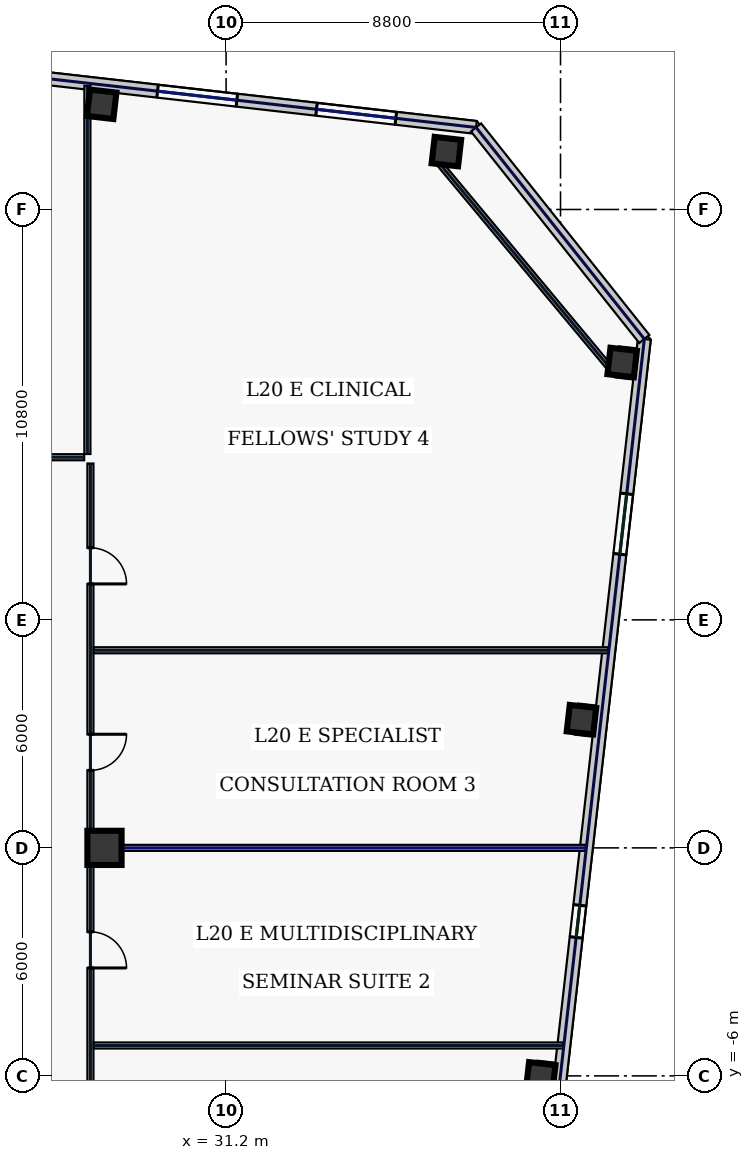
"""IFC4 building model, lengths in metres.
Left out: names, types, materials, properties, quantities, classifications, styles, units other than length and angle.
Written with IfcOpenShell. Run it as: python <this file> out.ifc"""

import sys

from ifc_helpers import new_model, si_unit, direction, frame, frame_2d, origin, origin_2d, place, context, subcontext, project, spatial, rectangle, hollow_rectangle, extrude, element, fill, save


model = new_model("IFC4")
c1 = context("Model", 3, precision=1e-05, world=origin(), true_north=direction((0.0, 1.0)))
c2 = subcontext(c1, "Body", "Model", "MODEL_VIEW")
j1 = project(units=[si_unit("LENGTHUNIT", "METRE"), si_unit("PLANEANGLEUNIT", "RADIAN")], contexts=[c1])
p1 = place(None, origin())
s1 = spatial("IfcSite", under=j1, at=p1, CompositionType="ELEMENT")
p2 = place(p1, origin())
s2 = spatial("IfcBuilding", under=s1, at=p2, CompositionType="ELEMENT")
p3 = place(p2, frame((0.0, 0.0, 93.4)))
s3 = spatial("IfcBuildingStorey", under=s2, at=p3, CompositionType="ELEMENT", Elevation=93.4)
p4 = place(p3, frame((28.0, 0.0, 0.0), z_axis=(0.0, 0.0, 1.0), x_axis=(1.0, 0.0, 0.0)))
e1 = element("IfcColumn", 1, at=p4, inside=s3, PredefinedType="COLUMN", context=c2, shape_type="SweptSolid", body=[
    extrude(hollow_rectangle(XDim=0.9, YDim=0.9, WallThickness=0.04, at=origin_2d()), origin(), (0.0, 0.0, 1.0), 3.74),
])
for number, where, z_axis, x_axis in (
    (2, (36.997, 18.323, 0.0), (0.0, 0.0, 1.0), (0.994, -0.113, 0.0)),
    (3, (27.926, 19.568, 0.0), (0.0, 0.0, 1.0), (0.994, -0.113, 0.0)),
    (4, (39.48, -6.025, 0.0), (0.0, 0.0, 1.0), (0.994, -0.113, 0.0)),
    (5, (40.551, 3.375, 0.0), (0.0, 0.0, 1.0), (0.994, -0.113, 0.0)),
    (6, (41.622, 12.774, 0.0), (0.0, 0.0, 1.0), (0.994, -0.113, 0.0)),
):
    element("IfcColumn", number, at=place(p3, frame(where, z_axis=z_axis, x_axis=x_axis)), inside=s3, PredefinedType="COLUMN", context=c2, shape_type="SweptSolid", body=[
        extrude(hollow_rectangle(XDim=0.7, YDim=0.7, WallThickness=0.032, at=origin_2d()), origin(), (0.0, 0.0, 1.0), 3.74),
    ])
p5 = place(p3, frame((37.777, 18.958, 0.0), z_axis=(0.0, 0.0, 1.0), x_axis=(-0.993571362037, 0.113207546299, 0.0)))
e7 = element("IfcWall", 7, at=p5, inside=s3, PredefinedType="STANDARD", context=c2, shape_type="SweptSolid", body=[
    extrude(rectangle(XDim=21.223, YDim=0.34, at=frame_2d((10.611, 0.0))), origin(), (0.0, 0.0, 1.0), 3.74),
])
p6 = place(p5, frame((15.756, 0.0, 0.22)))
e8 = element("IfcOpeningElement", 8, at=p6, cuts=e7, PredefinedType="OPENING", context=c2, shape_type="SweptSolid", body=[
    extrude(rectangle(XDim=1.6, YDim=1.2, at=frame_2d((0.8, 0.6))), frame((0.0, 0.18, 0.0), z_axis=(0.0, -1.0, 0.0), x_axis=(1.0, 0.0, 0.0)), (0.0, 0.0, 1.0), 0.36),
])
p7 = place(p5, frame((11.285, 0.0, 0.67)))
e9 = element("IfcOpeningElement", 9, at=p7, cuts=e7, PredefinedType="OPENING", context=c2, shape_type="SweptSolid", body=[
    extrude(rectangle(XDim=2.1, YDim=2.2, at=frame_2d((1.05, 1.1))), frame((0.0, 0.18, 0.0), z_axis=(0.0, -1.0, 0.0), x_axis=(1.0, 0.0, 0.0)), (0.0, 0.0, 1.0), 0.36),
])
p8 = place(p5, frame((6.336, 0.0, 0.67)))
e10 = element("IfcOpeningElement", 10, at=p8, cuts=e7, PredefinedType="OPENING", context=c2, shape_type="SweptSolid", body=[
    extrude(rectangle(XDim=2.1, YDim=2.2, at=frame_2d((1.05, 1.1))), frame((0.0, 0.18, 0.0), z_axis=(0.0, -1.0, 0.0), x_axis=(1.0, 0.0, 0.0)), (0.0, 0.0, 1.0), 0.36),
])
p9 = place(p5, frame((2.125, 0.0, 0.67)))
e11 = element("IfcOpeningElement", 11, at=p9, cuts=e7, PredefinedType="OPENING", context=c2, shape_type="SweptSolid", body=[
    extrude(rectangle(XDim=2.1, YDim=2.2, at=frame_2d((1.05, 1.1))), frame((0.0, 0.18, 0.0), z_axis=(0.0, -1.0, 0.0), x_axis=(1.0, 0.0, 0.0)), (0.0, 0.0, 1.0), 0.36),
])
p10 = place(p3, frame((37.768, -25.556, 0.0), z_axis=(0.0, 0.0, 1.0), x_axis=(0.113201605824, 0.993572038877, 0.0)))
e12 = element("IfcWall", 12, at=p10, inside=s3, PredefinedType="STANDARD", context=c2, shape_type="SweptSolid", body=[
    extrude(rectangle(XDim=39.2, YDim=0.34, at=frame_2d((19.6, 0.0))), origin(), (0.0, 0.0, 1.0), 3.74),
])
p11 = place(p10, frame((4.1, 0.0, 0.58)))
e13 = element("IfcOpeningElement", 13, at=p11, cuts=e12, PredefinedType="OPENING", context=c2, shape_type="SweptSolid", body=[
    extrude(rectangle(XDim=1.6, YDim=2.3, at=frame_2d((0.8, 1.15))), frame((0.0, 0.18, 0.0), z_axis=(0.0, -1.0, 0.0), x_axis=(1.0, 0.0, 0.0)), (0.0, 0.0, 1.0), 0.36),
])
p12 = place(p10, frame((13.9, 0.0, 0.58)))
e14 = element("IfcOpeningElement", 14, at=p12, cuts=e12, PredefinedType="OPENING", context=c2, shape_type="SweptSolid", body=[
    extrude(rectangle(XDim=1.6, YDim=2.3, at=frame_2d((0.8, 1.15))), frame((0.0, 0.18, 0.0), z_axis=(0.0, -1.0, 0.0), x_axis=(1.0, 0.0, 0.0)), (0.0, 0.0, 1.0), 0.36),
])
p13 = place(p10, frame((23.35, 0.0, 0.75)))
e15 = element("IfcOpeningElement", 15, at=p13, cuts=e12, PredefinedType="OPENING", context=c2, shape_type="SweptSolid", body=[
    extrude(rectangle(XDim=0.85, YDim=1.85, at=frame_2d((0.425, 0.925))), frame((0.0, 0.18, 0.0), z_axis=(0.0, -1.0, 0.0), x_axis=(1.0, 0.0, 0.0)), (0.0, 0.0, 1.0), 0.36),
])
p14 = place(p10, frame((33.5, 0.0, 0.58)))
e16 = element("IfcOpeningElement", 16, at=p14, cuts=e12, PredefinedType="OPENING", context=c2, shape_type="SweptSolid", body=[
    extrude(rectangle(XDim=1.6, YDim=2.3, at=frame_2d((0.8, 1.15))), frame((0.0, 0.18, 0.0), z_axis=(0.0, -1.0, 0.0), x_axis=(1.0, 0.0, 0.0)), (0.0, 0.0, 1.0), 0.36),
])
p15 = place(p3, frame((42.206, 13.392, 0.0), z_axis=(0.0, 0.0, 1.0), x_axis=(-0.622524521309, 0.782600294128, 0.0)))
e17 = element("IfcWall", 17, at=p15, inside=s3, PredefinedType="STANDARD", context=c2, shape_type="SweptSolid", body=[
    extrude(rectangle(XDim=7.113, YDim=0.34, at=frame_2d((3.557, 0.0))), origin(), (0.0, 0.0, 1.0), 3.74),
])
p16 = place(p3, frame((41.361, 12.556, 0.0), z_axis=(0.0, 0.0, 1.0), x_axis=(-0.640217638562, 0.768193579298, 0.0)))
e18 = element("IfcWall", 18, at=p16, inside=s3, PredefinedType="PARTITIONING", context=c2, shape_type="SweptSolid", body=[
    extrude(rectangle(XDim=7.224, YDim=0.16, at=frame_2d((3.612, 0.0))), origin(), (0.0, 0.0, 1.0), 3.74),
])
p17 = place(p3, frame((-27.465, 10.28, 0.0), z_axis=(0.0, 0.0, 1.0), x_axis=(1.0, 0.0, 0.0)))
e19 = element("IfcWall", 19, at=p17, inside=s3, PredefinedType="PARTITIONING", context=c2, shape_type="SweptSolid", body=[
    extrude(rectangle(XDim=54.93, YDim=0.16, at=frame_2d((27.465, 0.0))), origin(), (0.0, 0.0, 1.0), 3.74),
])
p18 = place(p17, frame((1.869, 0.0, 0.0)))
e20 = element("IfcOpeningElement", 20, at=p18, cuts=e19, PredefinedType="OPENING", context=c2, shape_type="SweptSolid", body=[
    extrude(rectangle(XDim=1.3, YDim=2.2, at=frame_2d((0.65, 1.1))), frame((0.0, 0.09, 0.0), z_axis=(0.0, -1.0, 0.0), x_axis=(1.0, 0.0, 0.0)), (0.0, 0.0, 1.0), 0.18),
])
p19 = place(p17, frame((8.08, 0.0, 0.0)))
e21 = element("IfcOpeningElement", 21, at=p19, cuts=e19, PredefinedType="OPENING", context=c2, shape_type="SweptSolid", body=[
    extrude(rectangle(XDim=0.95, YDim=2.2, at=frame_2d((0.475, 1.1))), frame((0.0, 0.09, 0.0), z_axis=(0.0, -1.0, 0.0), x_axis=(1.0, 0.0, 0.0)), (0.0, 0.0, 1.0), 0.18),
])
p20 = place(p17, frame((14.555, 0.0, 0.0)))
e22 = element("IfcOpeningElement", 22, at=p20, cuts=e19, PredefinedType="OPENING", context=c2, shape_type="SweptSolid", body=[
    extrude(rectangle(XDim=1.3, YDim=2.2, at=frame_2d((0.65, 1.1))), frame((0.0, 0.09, 0.0), z_axis=(0.0, -1.0, 0.0), x_axis=(1.0, 0.0, 0.0)), (0.0, 0.0, 1.0), 0.18),
])
p21 = place(p17, frame((21.2, 0.0, 0.0)))
e23 = element("IfcOpeningElement", 23, at=p21, cuts=e19, PredefinedType="OPENING", context=c2, shape_type="SweptSolid", body=[
    extrude(rectangle(XDim=0.95, YDim=2.2, at=frame_2d((0.475, 1.1))), frame((0.0, 0.09, 0.0), z_axis=(0.0, -1.0, 0.0), x_axis=(1.0, 0.0, 0.0)), (0.0, 0.0, 1.0), 0.18),
])
p22 = place(p17, frame((28.2, 0.0, 0.0)))
e24 = element("IfcOpeningElement", 24, at=p22, cuts=e19, PredefinedType="OPENING", context=c2, shape_type="SweptSolid", body=[
    extrude(rectangle(XDim=1.05, YDim=2.2, at=frame_2d((0.525, 1.1))), frame((0.0, 0.09, 0.0), z_axis=(0.0, -1.0, 0.0), x_axis=(1.0, 0.0, 0.0)), (0.0, 0.0, 1.0), 0.18),
])
p23 = place(p17, frame((37.875, 0.0, 0.0)))
e25 = element("IfcOpeningElement", 25, at=p23, cuts=e19, PredefinedType="OPENING", context=c2, shape_type="SweptSolid", body=[
    extrude(rectangle(XDim=0.95, YDim=2.2, at=frame_2d((0.475, 1.1))), frame((0.0, 0.09, 0.0), z_axis=(0.0, -1.0, 0.0), x_axis=(1.0, 0.0, 0.0)), (0.0, 0.0, 1.0), 0.18),
])
p24 = place(p17, frame((46.95, 0.0, 0.0)))
e26 = element("IfcOpeningElement", 26, at=p24, cuts=e19, PredefinedType="OPENING", context=c2, shape_type="SweptSolid", body=[
    extrude(rectangle(XDim=1.3, YDim=2.2, at=frame_2d((0.65, 1.1))), frame((0.0, 0.09, 0.0), z_axis=(0.0, -1.0, 0.0), x_axis=(1.0, 0.0, 0.0)), (0.0, 0.0, 1.0), 0.18),
])
p25 = place(p17, frame((52.106, 0.0, 0.0)))
e27 = element("IfcOpeningElement", 27, at=p25, cuts=e19, PredefinedType="OPENING", context=c2, shape_type="SweptSolid", body=[
    extrude(rectangle(XDim=0.95, YDim=2.2, at=frame_2d((0.475, 1.1))), frame((0.0, 0.09, 0.0), z_axis=(0.0, -1.0, 0.0), x_axis=(1.0, 0.0, 0.0)), (0.0, 0.0, 1.0), 0.18),
])
p26 = place(p3, frame((27.63, 10.115, 0.0), z_axis=(0.0, 0.0, 1.0), x_axis=(0.0, -1.0, 0.0)))
e28 = element("IfcWall", 28, at=p26, inside=s3, PredefinedType="PARTITIONING", context=c2, shape_type="SweptSolid", body=[
    extrude(rectangle(XDim=20.13, YDim=0.16, at=frame_2d((10.065, 0.0))), origin(), (0.0, 0.0, 1.0), 3.74),
])
p27 = place(p26, frame((17.181, 0.0, 0.0)))
e29 = element("IfcOpeningElement", 29, at=p27, cuts=e28, PredefinedType="OPENING", context=c2, shape_type="SweptSolid", body=[
    extrude(rectangle(XDim=0.95, YDim=2.2, at=frame_2d((0.475, 1.1))), frame((0.0, 0.09, 0.0), z_axis=(0.0, -1.0, 0.0), x_axis=(1.0, 0.0, 0.0)), (0.0, 0.0, 1.0), 0.18),
])
p28 = place(p26, frame((12.325, 0.0, 0.0)))
e30 = element("IfcOpeningElement", 30, at=p28, cuts=e28, PredefinedType="OPENING", context=c2, shape_type="SweptSolid", body=[
    extrude(rectangle(XDim=0.95, YDim=2.2, at=frame_2d((0.475, 1.1))), frame((0.0, 0.09, 0.0), z_axis=(0.0, -1.0, 0.0), x_axis=(1.0, 0.0, 0.0)), (0.0, 0.0, 1.0), 0.18),
])
p29 = place(p26, frame((7.125, 0.0, 0.0)))
e31 = element("IfcOpeningElement", 31, at=p29, cuts=e28, PredefinedType="OPENING", context=c2, shape_type="SweptSolid", body=[
    extrude(rectangle(XDim=0.95, YDim=2.2, at=frame_2d((0.475, 1.1))), frame((0.0, 0.09, 0.0), z_axis=(0.0, -1.0, 0.0), x_axis=(1.0, 0.0, 0.0)), (0.0, 0.0, 1.0), 0.18),
])
p30 = place(p26, frame((2.219, 0.0, 0.0)))
e32 = element("IfcOpeningElement", 32, at=p30, cuts=e28, PredefinedType="OPENING", context=c2, shape_type="SweptSolid", body=[
    extrude(rectangle(XDim=0.95, YDim=2.2, at=frame_2d((0.475, 1.1))), frame((0.0, 0.09, 0.0), z_axis=(0.0, -1.0, 0.0), x_axis=(1.0, 0.0, 0.0)), (0.0, 0.0, 1.0), 0.18),
])
p31 = place(p3, frame((27.55, 10.365, 0.0), z_axis=(0.0, 0.0, 1.0), x_axis=(0.0, 1.0, 0.0)))
e33 = element("IfcWall", 33, at=p31, inside=s3, PredefinedType="PARTITIONING", context=c2, shape_type="SweptSolid", body=[
    extrude(rectangle(XDim=9.688, YDim=0.16, at=frame_2d((4.844, 0.0))), origin(), (0.0, 0.0, 1.0), 3.74),
])
p32 = place(p3, frame((27.715, -5.2, 0.0), z_axis=(0.0, 0.0, 1.0), x_axis=(1.0, 0.0, 0.0)))
e34 = element("IfcWall", 34, at=p32, inside=s3, PredefinedType="PARTITIONING", context=c2, shape_type="SweptSolid", body=[
    extrude(rectangle(XDim=12.352, YDim=0.16, at=frame_2d((6.176, 0.0))), origin(), (0.0, 0.0, 1.0), 3.74),
])
p33 = place(p3, frame((27.715, 0.0, 0.0), z_axis=(0.0, 0.0, 1.0), x_axis=(1.0, 0.0, 0.0)))
e35 = element("IfcWall", 35, at=p33, inside=s3, PredefinedType="PARTITIONING", context=c2, shape_type="SweptSolid", body=[
    extrude(rectangle(XDim=12.945, YDim=0.16, at=frame_2d((6.472, 0.0))), origin(), (0.0, 0.0, 1.0), 3.235),
])
p34 = place(p3, frame((27.715, 5.2, 0.0), z_axis=(0.0, 0.0, 1.0), x_axis=(1.0, 0.0, 0.0)))
e36 = element("IfcWall", 36, at=p34, inside=s3, PredefinedType="PARTITIONING", context=c2, shape_type="SweptSolid", body=[
    extrude(rectangle(XDim=13.537, YDim=0.16, at=frame_2d((6.769, 0.0))), origin(), (0.0, 0.0, 1.0), 3.74),
])
p35 = place(p8, origin())
e37 = element("IfcWindow", 37, at=p35, inside=s3, PartitioningType="SINGLE_PANEL", PredefinedType="WINDOW", context=c2, shape_type="SweptSolid", body=[
    extrude(rectangle(XDim=2.1, YDim=2.2, at=frame_2d((1.05, 1.1))), frame((0.0, 0.03, 0.0), z_axis=(0.0, -1.0, 0.0), x_axis=(1.0, 0.0, 0.0)), (0.0, 0.0, 1.0), 0.06),
])
fill(e10, e37)
p36 = place(p9, origin())
e38 = element("IfcWindow", 38, at=p36, inside=s3, PartitioningType="SINGLE_PANEL", PredefinedType="WINDOW", context=c2, shape_type="SweptSolid", body=[
    extrude(rectangle(XDim=2.1, YDim=2.2, at=frame_2d((1.05, 1.1))), frame((0.0, 0.03, 0.0), z_axis=(0.0, -1.0, 0.0), x_axis=(1.0, 0.0, 0.0)), (0.0, 0.0, 1.0), 0.06),
])
fill(e11, e38)
p37 = place(p13, origin())
e39 = element("IfcWindow", 39, at=p37, inside=s3, PartitioningType="SINGLE_PANEL", PredefinedType="WINDOW", context=c2, shape_type="SweptSolid", body=[
    extrude(rectangle(XDim=0.85, YDim=1.85, at=frame_2d((0.425, 0.925))), frame((0.0, 0.03, 0.0), z_axis=(0.0, -1.0, 0.0), x_axis=(1.0, 0.0, 0.0)), (0.0, 0.0, 1.0), 0.06),
])
fill(e15, e39)
p38 = place(p14, origin())
e40 = element("IfcWindow", 40, at=p38, inside=s3, PartitioningType="SINGLE_PANEL", PredefinedType="WINDOW", context=c2, shape_type="SweptSolid", body=[
    extrude(rectangle(XDim=1.6, YDim=2.3, at=frame_2d((0.8, 1.15))), frame((0.0, 0.03, 0.0), z_axis=(0.0, -1.0, 0.0), x_axis=(1.0, 0.0, 0.0)), (0.0, 0.0, 1.0), 0.06),
])
fill(e16, e40)
p39 = place(p28, origin())
e41 = element("IfcDoor", 41, at=p39, inside=s3, OperationType="SINGLE_SWING_RIGHT", PredefinedType="DOOR", context=c2, shape_type="SweptSolid", body=[
    extrude(rectangle(XDim=0.95, YDim=2.2, at=frame_2d((0.475, 1.1))), frame((0.0, 0.025, 0.0), z_axis=(0.0, -1.0, 0.0), x_axis=(1.0, 0.0, 0.0)), (0.0, 0.0, 1.0), 0.05),
])
fill(e30, e41)
p40 = place(p29, origin())
e42 = element("IfcDoor", 42, at=p40, inside=s3, OperationType="SINGLE_SWING_LEFT", PredefinedType="DOOR", context=c2, shape_type="SweptSolid", body=[
    extrude(rectangle(XDim=0.95, YDim=2.2, at=frame_2d((0.475, 1.1))), frame((0.0, 0.025, 0.0), z_axis=(0.0, -1.0, 0.0), x_axis=(1.0, 0.0, 0.0)), (0.0, 0.0, 1.0), 0.05),
])
fill(e31, e42)
p41 = place(p30, origin())
e43 = element("IfcDoor", 43, at=p41, inside=s3, OperationType="SINGLE_SWING_RIGHT", PredefinedType="DOOR", context=c2, shape_type="SweptSolid", body=[
    extrude(rectangle(XDim=0.95, YDim=2.2, at=frame_2d((0.475, 1.1))), frame((0.0, 0.025, 0.0), z_axis=(0.0, -1.0, 0.0), x_axis=(1.0, 0.0, 0.0)), (0.0, 0.0, 1.0), 0.05),
])
fill(e32, e43)
save(model, sys.argv[1])
